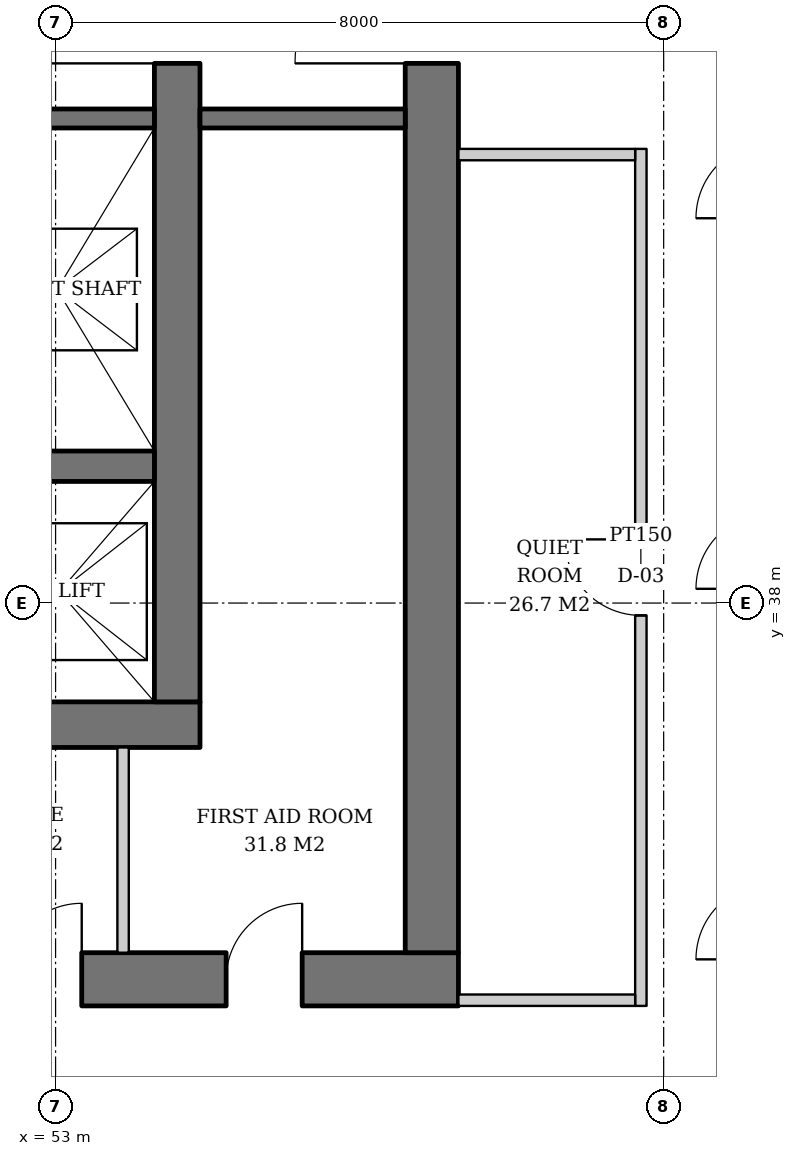
"""IFC4 building model, lengths in metres.
Left out: names, types, materials, properties, quantities, classifications, styles, units other than length and angle.
Written with IfcOpenShell. Run it as: python <this file> out.ifc"""

import sys

from ifc_helpers import new_model, si_unit, direction, frame, frame_2d, origin, place, context, subcontext, project, spatial, rectangle, extrude, element, fill, save


model = new_model("IFC4")
c1 = context("Model", 3, precision=1e-05, world=origin(), true_north=direction((0.0, 1.0)))
c2 = subcontext(c1, "Body", "Model", "MODEL_VIEW")
j1 = project(units=[si_unit("LENGTHUNIT", "METRE"), si_unit("PLANEANGLEUNIT", "RADIAN")], contexts=[c1])
p1 = place(None, origin())
s1 = spatial("IfcSite", under=j1, at=p1, CompositionType="ELEMENT")
p2 = place(p1, origin())
s2 = spatial("IfcBuilding", under=s1, at=p2, CompositionType="ELEMENT")
p3 = place(p2, frame((0.0, 0.0, 104.6)))
s3 = spatial("IfcBuildingStorey", under=s2, at=p3, CompositionType="ELEMENT", Elevation=104.6)
p4 = place(p3, frame((35.1, 36.4, 0.0), z_axis=(0.0, 0.0, 1.0), x_axis=(1.0, 0.0, 0.0)))
e1 = element("IfcWall", 1, at=p4, inside=s3, PredefinedType="SHEAR", context=c2, shape_type="SweptSolid", body=[
    extrude(rectangle(XDim=19.8, YDim=0.6, at=frame_2d((9.9, 0.0))), origin(), (0.0, 0.0, 1.0), 3.8),
])
p5 = place(p4, frame((3.9, 0.0, 0.0)))
e2 = element("IfcOpeningElement", 2, at=p5, cuts=e1, PredefinedType="OPENING", context=c2, shape_type="SweptSolid", body=[
    extrude(rectangle(XDim=1.0, YDim=2.1, at=frame_2d((0.5, 1.05))), frame((0.0, 0.31, 0.0), z_axis=(0.0, -1.0, 0.0), x_axis=(1.0, 0.0, 0.0)), (0.0, 0.0, 1.0), 0.62),
])
p6 = place(p4, frame((15.35, 0.0, 0.0)))
e3 = element("IfcOpeningElement", 3, at=p6, cuts=e1, PredefinedType="OPENING", context=c2, shape_type="SweptSolid", body=[
    extrude(rectangle(XDim=1.0, YDim=2.1, at=frame_2d((0.5, 1.05))), frame((0.0, 0.31, 0.0), z_axis=(0.0, -1.0, 0.0), x_axis=(1.0, 0.0, 0.0)), (0.0, 0.0, 1.0), 0.62),
])
p7 = place(p3, frame((54.6, 36.7, 0.0), z_axis=(0.0, 0.0, 1.0), x_axis=(0.0, 1.0, 0.0)))
e4 = element("IfcWall", 4, at=p7, inside=s3, PredefinedType="SHEAR", context=c2, shape_type="SweptSolid", body=[
    extrude(rectangle(XDim=18.6, YDim=0.6, at=frame_2d((9.3, 0.0))), origin(), (0.0, 0.0, 1.0), 3.8),
])
p8 = place(p7, frame((8.4, 0.0, 0.0)))
e5 = element("IfcOpeningElement", 5, at=p8, cuts=e4, PredefinedType="OPENING", context=c2, shape_type="SweptSolid", body=[
    extrude(rectangle(XDim=1.8, YDim=2.4, at=frame_2d((0.9, 1.2))), frame((0.0, 0.31, 0.0), z_axis=(0.0, -1.0, 0.0), x_axis=(1.0, 0.0, 0.0)), (0.0, 0.0, 1.0), 0.62),
])
p9 = place(p3, frame((31.7, 33.05, 0.0), z_axis=(0.0, 0.0, 1.0), x_axis=(1.0, 0.0, 0.0)))
e6 = element("IfcWall", 6, at=p9, inside=s3, PredefinedType="SHEAR", context=c2, shape_type="SweptSolid", body=[
    extrude(rectangle(XDim=26.6, YDim=0.7, at=frame_2d((13.3, 0.0))), origin(), (0.0, 0.0, 1.0), 3.8),
])
p10 = place(p9, frame((7.3, 0.0, 0.0)))
e7 = element("IfcOpeningElement", 7, at=p10, cuts=e6, PredefinedType="OPENING", context=c2, shape_type="SweptSolid", body=[
    extrude(rectangle(XDim=1.0, YDim=2.1, at=frame_2d((0.5, 1.05))), frame((0.0, 0.36, 0.0), z_axis=(0.0, -1.0, 0.0), x_axis=(1.0, 0.0, 0.0)), (0.0, 0.0, 1.0), 0.72),
])
p11 = place(p9, frame((18.75, 0.0, 0.0)))
e8 = element("IfcOpeningElement", 8, at=p11, cuts=e6, PredefinedType="OPENING", context=c2, shape_type="SweptSolid", body=[
    extrude(rectangle(XDim=1.0, YDim=2.1, at=frame_2d((0.5, 1.05))), frame((0.0, 0.36, 0.0), z_axis=(0.0, -1.0, 0.0), x_axis=(1.0, 0.0, 0.0)), (0.0, 0.0, 1.0), 0.72),
])
p12 = place(p9, frame((1.85, 0.0, 0.0)))
e9 = element("IfcOpeningElement", 9, at=p12, cuts=e6, PredefinedType="OPENING", context=c2, shape_type="SweptSolid", body=[
    extrude(rectangle(XDim=1.0, YDim=2.1, at=frame_2d((0.5, 1.05))), frame((0.0, 0.36, 0.0), z_axis=(0.0, -1.0, 0.0), x_axis=(1.0, 0.0, 0.0)), (0.0, 0.0, 1.0), 0.72),
])
p13 = place(p9, frame((4.7, 0.0, 0.0)))
e10 = element("IfcOpeningElement", 10, at=p13, cuts=e6, PredefinedType="OPENING", context=c2, shape_type="SweptSolid", body=[
    extrude(rectangle(XDim=1.0, YDim=2.1, at=frame_2d((0.5, 1.05))), frame((0.0, 0.36, 0.0), z_axis=(0.0, -1.0, 0.0), x_axis=(1.0, 0.0, 0.0)), (0.0, 0.0, 1.0), 0.72),
])
p14 = place(p9, frame((12.44, 0.0, 0.0)))
e11 = element("IfcOpeningElement", 11, at=p14, cuts=e6, PredefinedType="OPENING", context=c2, shape_type="SweptSolid", body=[
    extrude(rectangle(XDim=1.0, YDim=2.1, at=frame_2d((0.5, 1.05))), frame((0.0, 0.36, 0.0), z_axis=(0.0, -1.0, 0.0), x_axis=(1.0, 0.0, 0.0)), (0.0, 0.0, 1.0), 0.72),
])
p15 = place(p9, frame((20.644, 0.0, 0.0)))
e12 = element("IfcOpeningElement", 12, at=p15, cuts=e6, PredefinedType="OPENING", context=c2, shape_type="SweptSolid", body=[
    extrude(rectangle(XDim=1.0, YDim=2.1, at=frame_2d((0.5, 1.05))), frame((0.0, 0.36, 0.0), z_axis=(0.0, -1.0, 0.0), x_axis=(1.0, 0.0, 0.0)), (0.0, 0.0, 1.0), 0.72),
])
p16 = place(p9, frame((23.544, 0.0, 0.0)))
e13 = element("IfcOpeningElement", 13, at=p16, cuts=e6, PredefinedType="OPENING", context=c2, shape_type="SweptSolid", body=[
    extrude(rectangle(XDim=1.0, YDim=2.1, at=frame_2d((0.5, 1.05))), frame((0.0, 0.36, 0.0), z_axis=(0.0, -1.0, 0.0), x_axis=(1.0, 0.0, 0.0)), (0.0, 0.0, 1.0), 0.72),
])
p17 = place(p3, frame((57.95, 33.4, 0.0), z_axis=(0.0, 0.0, 1.0), x_axis=(0.0, 1.0, 0.0)))
e14 = element("IfcWall", 14, at=p17, inside=s3, PredefinedType="SHEAR", context=c2, shape_type="SweptSolid", body=[
    extrude(rectangle(XDim=25.2, YDim=0.7, at=frame_2d((12.6, 0.0))), origin(), (0.0, 0.0, 1.0), 3.8),
])
p18 = place(p17, frame((11.7, 0.0, 0.0)))
e15 = element("IfcOpeningElement", 15, at=p18, cuts=e14, PredefinedType="OPENING", context=c2, shape_type="SweptSolid", body=[
    extrude(rectangle(XDim=1.8, YDim=2.4, at=frame_2d((0.9, 1.2))), frame((0.0, 0.36, 0.0), z_axis=(0.0, -1.0, 0.0), x_axis=(1.0, 0.0, 0.0)), (0.0, 0.0, 1.0), 0.72),
])
p19 = place(p3, frame((35.7, 39.8, 0.0), z_axis=(0.0, 0.0, 1.0), x_axis=(1.0, 0.0, 0.0)))
e16 = element("IfcWall", 16, at=p19, inside=s3, PredefinedType="SHEAR", context=c2, shape_type="SweptSolid", body=[
    extrude(rectangle(XDim=18.6, YDim=0.4, at=frame_2d((9.3, 0.0))), origin(), (0.0, 0.0, 1.0), 3.8),
])
p20 = place(p3, frame((48.93, 44.375, 0.0), z_axis=(0.0, 0.0, 1.0), x_axis=(1.0, 0.0, 0.0)))
e17 = element("IfcWall", 17, at=p20, inside=s3, PredefinedType="SHEAR", context=c2, shape_type="SweptSolid", body=[
    extrude(rectangle(XDim=5.37, YDim=0.25, at=frame_2d((2.685, 0.0))), origin(), (0.0, 0.0, 1.0), 3.8),
])
p21 = place(p3, frame((54.9, 44.375, 0.0), z_axis=(0.0, 0.0, 1.0), x_axis=(1.0, 0.0, 0.0)))
e18 = element("IfcWall", 18, at=p21, inside=s3, PredefinedType="SOLIDWALL", context=c2, shape_type="SweptSolid", body=[
    extrude(rectangle(XDim=2.7, YDim=0.25, at=frame_2d((1.35, 0.0))), origin(), (0.0, 0.0, 1.0), 3.62),
])
p22 = place(p3, frame((53.888, 33.4, 0.0), z_axis=(0.0, 0.0, 1.0), x_axis=(0.0, 1.0, 0.0)))
e19 = element("IfcWall", 19, at=p22, inside=s3, PredefinedType="SOLIDWALL", context=c2, shape_type="SweptSolid", body=[
    extrude(rectangle(XDim=2.7, YDim=0.15, at=frame_2d((1.35, 0.0))), origin(), (0.0, 0.0, 1.0), 3.62),
])
p23 = place(p3, frame((60.7, 32.7, 0.0), z_axis=(0.0, 0.0, 1.0), x_axis=(0.0, 1.0, 0.0)))
e20 = element("IfcWall", 20, at=p23, inside=s3, PredefinedType="PARTITIONING", context=c2, shape_type="SweptSolid", body=[
    extrude(rectangle(XDim=11.275, YDim=0.15, at=frame_2d((5.638, 0.0))), origin(), (0.0, 0.0, 1.0), 2.72),
])
p24 = place(p23, frame((5.137, 0.0, 0.0)))
e21 = element("IfcOpeningElement", 21, at=p24, cuts=e20, PredefinedType="OPENING", context=c2, shape_type="SweptSolid", body=[
    extrude(rectangle(XDim=1.0, YDim=2.1, at=frame_2d((0.5, 1.05))), frame((0.0, 0.085, 0.0), z_axis=(0.0, -1.0, 0.0), x_axis=(1.0, 0.0, 0.0)), (0.0, 0.0, 1.0), 0.17),
])
for number, where, z_axis, x_axis in (
    (22, (58.3, 32.775, 0.0), (0.0, 0.0, 1.0), (1.0, 0.0, 0.0)),
    (23, (58.3, 43.9, 0.0), (0.0, 0.0, 1.0), (1.0, 0.0, 0.0)),
):
    element("IfcWall", number, at=place(p3, frame(where, z_axis=z_axis, x_axis=x_axis)), inside=s3, PredefinedType="PARTITIONING", context=c2, shape_type="SweptSolid", body=[
        extrude(rectangle(XDim=2.325, YDim=0.15, at=frame_2d((1.163, 0.0))), origin(), (0.0, 0.0, 1.0), 3.62),
    ])
p25 = place(p8, origin())
e24 = element("IfcDoor", 24, at=p25, inside=s3, OperationType="DOUBLE_DOOR_SINGLE_SWING", PredefinedType="DOOR", context=c2, shape_type="SweptSolid", body=[
    extrude(rectangle(XDim=1.8, YDim=2.4, at=frame_2d((0.9, 1.2))), frame((0.0, 0.025, 0.0), z_axis=(0.0, -1.0, 0.0), x_axis=(1.0, 0.0, 0.0)), (0.0, 0.0, 1.0), 0.05),
])
fill(e5, e24)
p26 = place(p18, origin())
e25 = element("IfcDoor", 25, at=p26, inside=s3, OperationType="DOUBLE_DOOR_SINGLE_SWING", PredefinedType="DOOR", context=c2, shape_type="SweptSolid", body=[
    extrude(rectangle(XDim=1.8, YDim=2.4, at=frame_2d((0.9, 1.2))), frame((0.0, 0.025, 0.0), z_axis=(0.0, -1.0, 0.0), x_axis=(1.0, 0.0, 0.0)), (0.0, 0.0, 1.0), 0.05),
])
fill(e15, e25)
p27 = place(p15, origin())
e26 = element("IfcDoor", 26, at=p27, inside=s3, OperationType="SINGLE_SWING_RIGHT", PredefinedType="DOOR", context=c2, shape_type="SweptSolid", body=[
    extrude(rectangle(XDim=1.0, YDim=2.1, at=frame_2d((0.5, 1.05))), frame((0.0, 0.34, 0.0), z_axis=(0.0, -1.0, 0.0), x_axis=(1.0, 0.0, 0.0)), (0.0, 0.0, 1.0), 0.05),
])
fill(e12, e26)
p28 = place(p16, origin())
e27 = element("IfcDoor", 27, at=p28, inside=s3, OperationType="SINGLE_SWING_RIGHT", PredefinedType="DOOR", context=c2, shape_type="SweptSolid", body=[
    extrude(rectangle(XDim=1.0, YDim=2.1, at=frame_2d((0.5, 1.05))), frame((0.0, 0.34, 0.0), z_axis=(0.0, -1.0, 0.0), x_axis=(1.0, 0.0, 0.0)), (0.0, 0.0, 1.0), 0.05),
])
fill(e13, e27)
p29 = place(p24, origin())
e28 = element("IfcDoor", 28, at=p29, inside=s3, OperationType="SINGLE_SWING_RIGHT", PredefinedType="DOOR", context=c2, shape_type="SweptSolid", body=[
    extrude(rectangle(XDim=1.0, YDim=2.1, at=frame_2d((0.5, 1.05))), frame((0.0, 0.025, 0.0), z_axis=(0.0, -1.0, 0.0), x_axis=(1.0, 0.0, 0.0)), (0.0, 0.0, 1.0), 0.05),
])
fill(e21, e28)
save(model, sys.argv[1])
